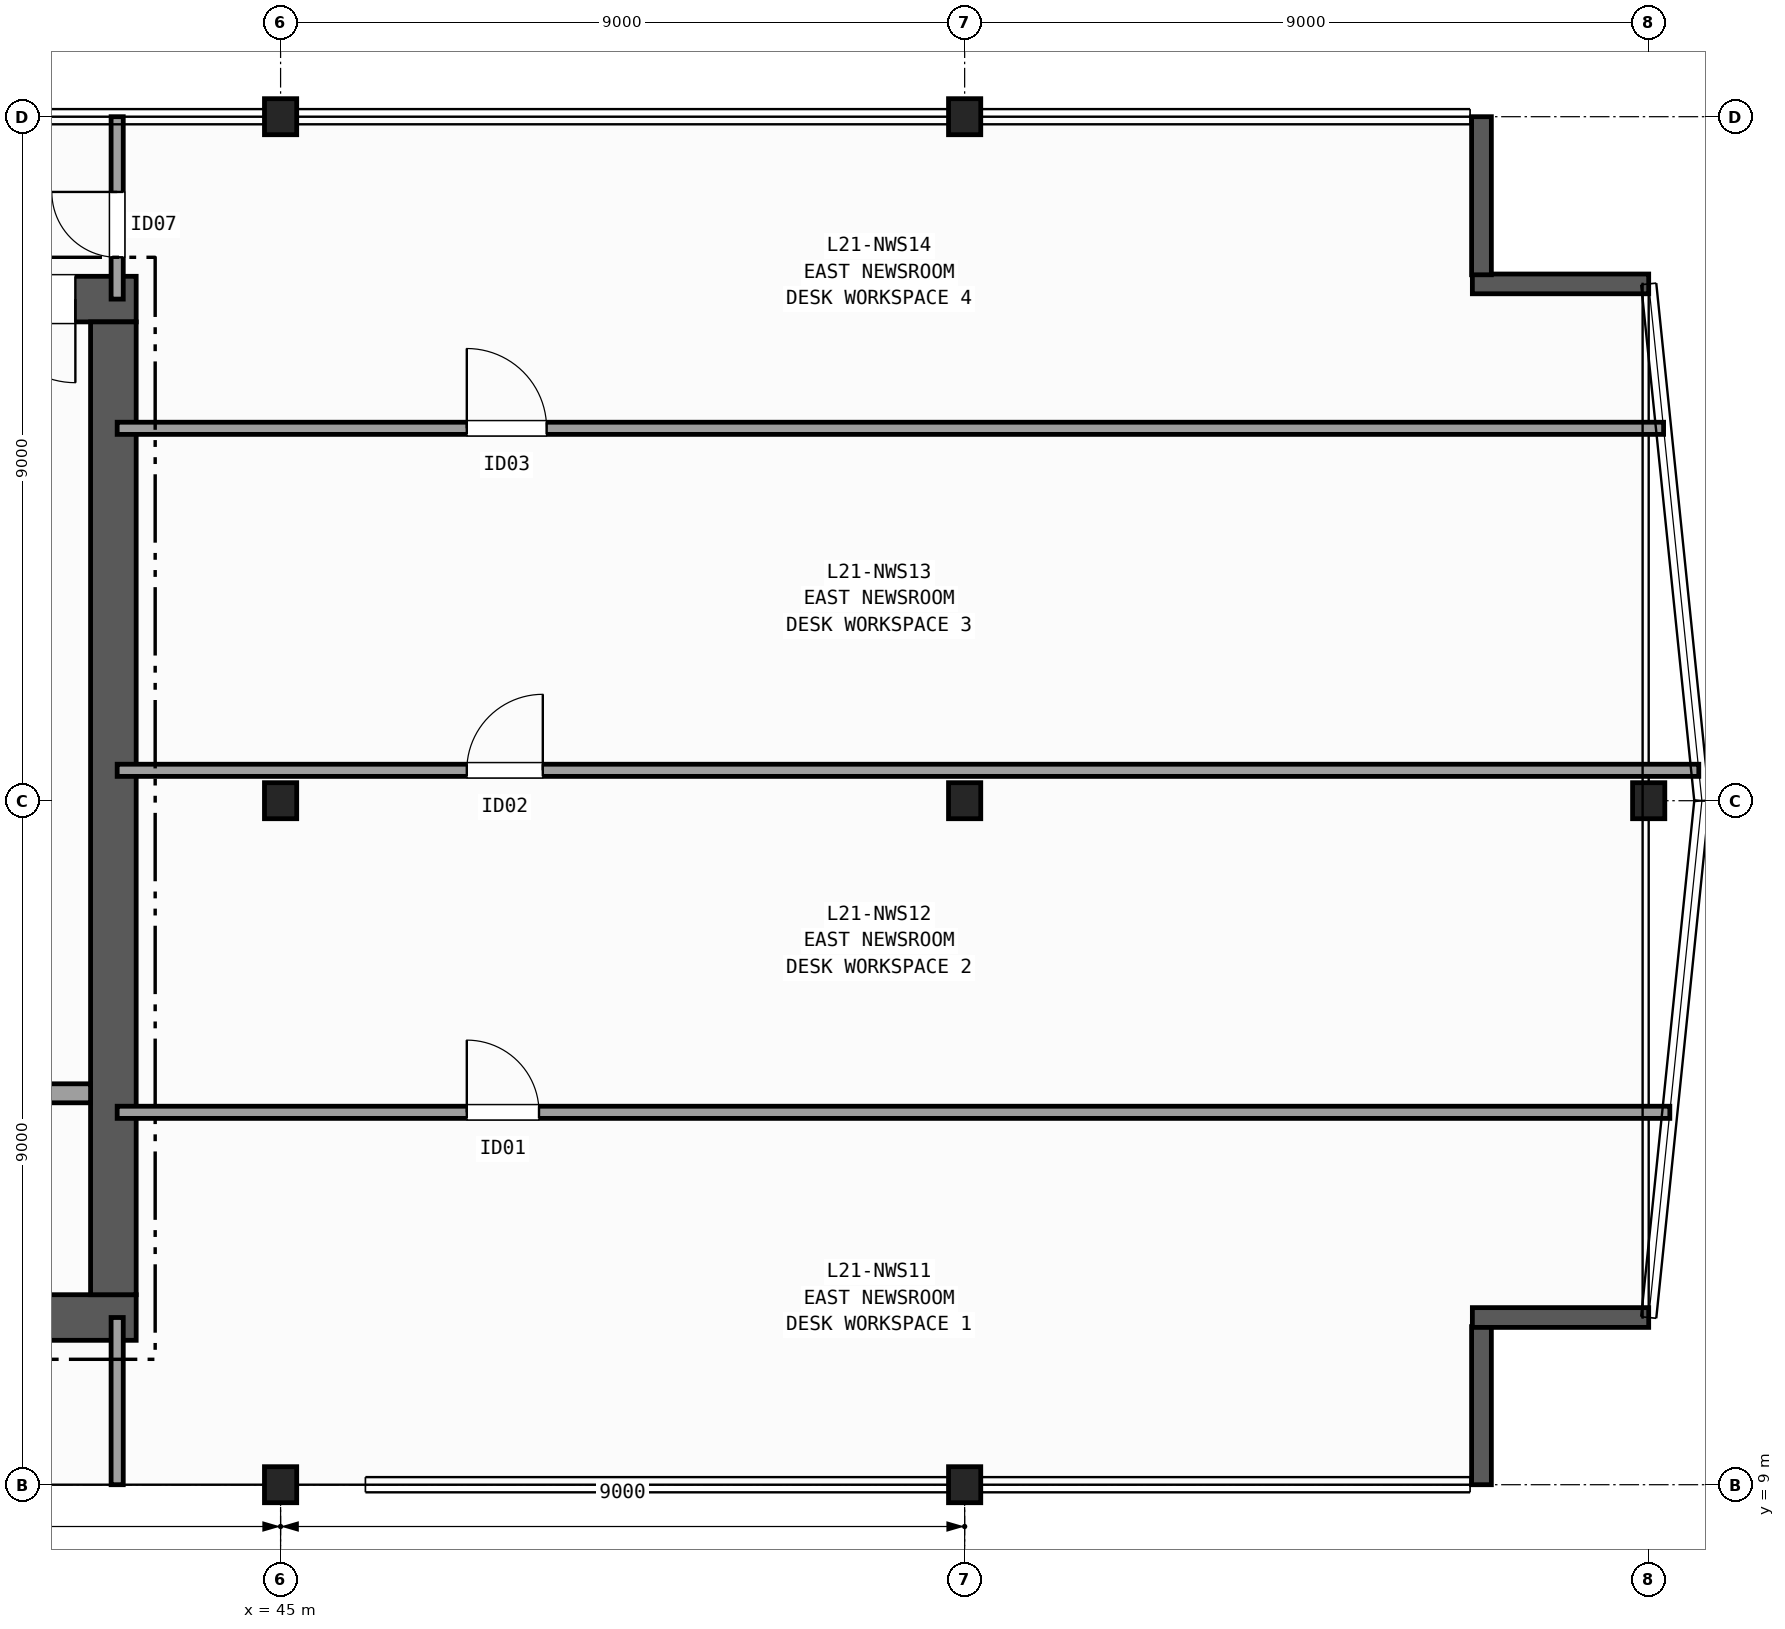
"""IFC4 building model, lengths in metres.
Left out: names, types, materials, properties, quantities, classifications, styles, units other than length and angle.
Written with IfcOpenShell. Run it as: python <this file> out.ifc"""

import sys

from ifc_helpers import new_model, si_unit, direction, frame, frame_2d, origin, origin_2d, place, context, subcontext, project, spatial, rectangle, i_section, extrude, element, fill, save


model = new_model("IFC4")
c1 = context("Model", 3, precision=1e-05, world=origin(), true_north=direction((0.0, 1.0)))
c2 = subcontext(c1, "Body", "Model", "MODEL_VIEW")
j1 = project(units=[si_unit("LENGTHUNIT", "METRE"), si_unit("PLANEANGLEUNIT", "RADIAN")], contexts=[c1])
p1 = place(None, origin())
s1 = spatial("IfcSite", under=j1, at=p1, CompositionType="ELEMENT")
p2 = place(p1, origin())
s2 = spatial("IfcBuilding", under=s1, at=p2, CompositionType="ELEMENT")
p3 = place(p2, frame((0.0, 0.0, 89.1)))
s3 = spatial("IfcBuildingStorey", under=s2, at=p3, CompositionType="ELEMENT", Elevation=89.1)
for number, where, z_axis, x_axis in (
    (1, (45.0, 9.0, 0.0), (0.0, 0.0, 1.0), (1.0, 0.0, 0.0)),
    (2, (45.0, 18.0, 0.0), (0.0, 0.0, 1.0), (1.0, 0.0, 0.0)),
    (3, (45.0, 27.0, 0.0), (0.0, 0.0, 1.0), (1.0, 0.0, 0.0)),
    (4, (54.0, 9.0, 0.0), (0.0, 0.0, 1.0), (1.0, 0.0, 0.0)),
    (5, (54.0, 18.0, 0.0), (0.0, 0.0, 1.0), (1.0, 0.0, 0.0)),
    (6, (54.0, 27.0, 0.0), (0.0, 0.0, 1.0), (1.0, 0.0, 0.0)),
    (7, (63.0, 18.0, 0.0), (0.0, 0.0, 1.0), (1.0, 0.0, 0.0)),
):
    element("IfcColumn", number, at=place(p3, frame(where, z_axis=z_axis, x_axis=x_axis)), inside=s3, PredefinedType="COLUMN", context=c2, shape_type="SweptSolid", body=[
        extrude(i_section(OverallWidth=0.424, OverallDepth=0.474, WebThickness=0.048, FlangeThickness=0.077, FilletRadius=0.015, at=origin_2d()), origin(), (0.0, 0.0, 1.0), 3.7),
    ])
p4 = place(p3, frame((60.8, 9.0, 0.0), z_axis=(0.0, 0.0, 1.0), x_axis=(0.0, 1.0, 0.0)))
e8 = element("IfcWall", 8, at=p4, inside=s3, PredefinedType="SOLIDWALL", context=c2, shape_type="SweptSolid", body=[
    extrude(rectangle(XDim=2.08, YDim=0.26, at=frame_2d((1.04, 0.0))), origin(), (0.0, 0.0, 1.0), 3.42),
])
for number, where, z_axis, x_axis in (
    (9, (60.68, 11.2, 0.0), (0.0, 0.0, 1.0), (1.0, 0.0, 0.0)),
    (10, (63.0, 24.8, 0.0), (0.0, 0.0, 1.0), (-1.0, 0.0, 0.0)),
):
    element("IfcWall", number, at=place(p3, frame(where, z_axis=z_axis, x_axis=x_axis)), inside=s3, PredefinedType="SOLIDWALL", context=c2, shape_type="SweptSolid", body=[
        extrude(rectangle(XDim=2.32, YDim=0.26, at=frame_2d((1.16, 0.0))), origin(), (0.0, 0.0, 1.0), 3.42),
    ])
p5 = place(p3, frame((60.8, 24.92, 0.0), z_axis=(0.0, 0.0, 1.0), x_axis=(0.0, 1.0, 0.0)))
e11 = element("IfcWall", 11, at=p5, inside=s3, PredefinedType="SOLIDWALL", context=c2, shape_type="SweptSolid", body=[
    extrude(rectangle(XDim=2.08, YDim=0.26, at=frame_2d((1.04, 0.0))), origin(), (0.0, 0.0, 1.0), 3.42),
])
p6 = place(p3, frame((29.1, 11.2, 0.0), z_axis=(0.0, 0.0, 1.0), x_axis=(1.0, 0.0, 0.0)))
e12 = element("IfcWall", 12, at=p6, inside=s3, PredefinedType="SHEAR", context=c2, shape_type="SweptSolid", body=[
    extrude(rectangle(XDim=14.0, YDim=0.6, at=frame_2d((7.0, 0.0))), origin(), (0.0, 0.0, 1.0), 3.42),
])
p7 = place(p3, frame((43.1, 24.6, 0.0), z_axis=(0.0, 0.0, 1.0), x_axis=(-1.0, 0.0, 0.0)))
e13 = element("IfcWall", 13, at=p7, inside=s3, PredefinedType="SHEAR", context=c2, shape_type="SweptSolid", body=[
    extrude(rectangle(XDim=14.0, YDim=0.6, at=frame_2d((7.0, 0.0))), origin(), (0.0, 0.0, 1.0), 3.42),
])
p8 = place(p7, frame((0.8, 0.0, 0.0)))
e14 = element("IfcOpeningElement", 14, at=p8, cuts=e13, PredefinedType="OPENING", context=c2, shape_type="SweptSolid", body=[
    extrude(rectangle(XDim=1.1, YDim=2.15, at=frame_2d((0.55, 1.075))), frame((0.0, 0.31, 0.0), z_axis=(0.0, -1.0, 0.0), x_axis=(1.0, 0.0, 0.0)), (0.0, 0.0, 1.0), 0.62),
])
p9 = place(p7, frame((2.3, 0.0, 0.0)))
e15 = element("IfcOpeningElement", 15, at=p9, cuts=e13, PredefinedType="OPENING", context=c2, shape_type="SweptSolid", body=[
    extrude(rectangle(XDim=0.9, YDim=2.1, at=frame_2d((0.45, 1.05))), frame((0.0, 0.31, 0.0), z_axis=(0.0, -1.0, 0.0), x_axis=(1.0, 0.0, 0.0)), (0.0, 0.0, 1.0), 0.62),
])
p10 = place(p7, frame((3.6, 0.0, 0.0)))
e16 = element("IfcOpeningElement", 16, at=p10, cuts=e13, PredefinedType="OPENING", context=c2, shape_type="SweptSolid", body=[
    extrude(rectangle(XDim=0.9, YDim=2.1, at=frame_2d((0.45, 1.05))), frame((0.0, 0.31, 0.0), z_axis=(0.0, -1.0, 0.0), x_axis=(1.0, 0.0, 0.0)), (0.0, 0.0, 1.0), 0.62),
])
p11 = place(p7, frame((4.95, 0.0, 0.0)))
e17 = element("IfcOpeningElement", 17, at=p11, cuts=e13, PredefinedType="OPENING", context=c2, shape_type="SweptSolid", body=[
    extrude(rectangle(XDim=0.9, YDim=2.1, at=frame_2d((0.45, 1.05))), frame((0.0, 0.31, 0.0), z_axis=(0.0, -1.0, 0.0), x_axis=(1.0, 0.0, 0.0)), (0.0, 0.0, 1.0), 0.62),
])
p12 = place(p3, frame((42.8, 11.5, 0.0), z_axis=(0.0, 0.0, 1.0), x_axis=(0.0, 1.0, 0.0)))
e18 = element("IfcWall", 18, at=p12, inside=s3, PredefinedType="SHEAR", context=c2, shape_type="SweptSolid", body=[
    extrude(rectangle(XDim=12.8, YDim=0.6, at=frame_2d((6.4, 0.0))), origin(), (0.0, 0.0, 1.0), 3.42),
])
p13 = place(p3, frame((33.07, 14.15, 0.0), z_axis=(0.0, 0.0, 1.0), x_axis=(1.0, 0.0, 0.0)))
e19 = element("IfcWall", 19, at=p13, inside=s3, PredefinedType="PARTITIONING", context=c2, shape_type="SweptSolid", body=[
    extrude(rectangle(XDim=9.43, YDim=0.25, at=frame_2d((4.715, 0.0))), origin(), (0.0, 0.0, 1.0), 3.42),
])
p14 = place(p13, frame((0.755, 0.0, 0.0)))
e20 = element("IfcOpeningElement", 20, at=p14, cuts=e19, PredefinedType="OPENING", context=c2, shape_type="SweptSolid", body=[
    extrude(rectangle(XDim=1.15, YDim=2.15, at=frame_2d((0.575, 1.075))), frame((0.0, 0.135, 0.0), z_axis=(0.0, -1.0, 0.0), x_axis=(1.0, 0.0, 0.0)), (0.0, 0.0, 1.0), 0.27),
])
p15 = place(p13, frame((3.355, 0.0, 0.0)))
e21 = element("IfcOpeningElement", 21, at=p15, cuts=e19, PredefinedType="OPENING", context=c2, shape_type="SweptSolid", body=[
    extrude(rectangle(XDim=1.15, YDim=2.15, at=frame_2d((0.575, 1.075))), frame((0.0, 0.135, 0.0), z_axis=(0.0, -1.0, 0.0), x_axis=(1.0, 0.0, 0.0)), (0.0, 0.0, 1.0), 0.27),
])
p16 = place(p3, frame((42.85, 9.0, 0.0), z_axis=(0.0, 0.0, 1.0), x_axis=(0.0, 1.0, 0.0)))
e22 = element("IfcWall", 22, at=p16, inside=s3, PredefinedType="PARTITIONING", context=c2, shape_type="SweptSolid", body=[
    extrude(rectangle(XDim=2.2, YDim=0.16, at=frame_2d((1.1, 0.0))), origin(), (0.0, 0.0, 1.0), 2.627),
])
p17 = place(p3, frame((42.85, 24.6, 0.0), z_axis=(0.0, 0.0, 1.0), x_axis=(0.0, 1.0, 0.0)))
e23 = element("IfcWall", 23, at=p17, inside=s3, PredefinedType="PARTITIONING", context=c2, shape_type="SweptSolid", body=[
    extrude(rectangle(XDim=2.4, YDim=0.16, at=frame_2d((1.2, 0.0))), origin(), (0.0, 0.0, 1.0), 2.627),
])
p18 = place(p17, frame((0.55, 0.0, 0.0)))
e24 = element("IfcOpeningElement", 24, at=p18, cuts=e23, PredefinedType="OPENING", context=c2, shape_type="SweptSolid", body=[
    extrude(rectangle(XDim=0.86, YDim=2.05, at=frame_2d((0.43, 1.025))), frame((0.0, 0.09, 0.0), z_axis=(0.0, -1.0, 0.0), x_axis=(1.0, 0.0, 0.0)), (0.0, 0.0, 1.0), 0.18),
])
p19 = place(p3, frame((42.85, 13.9, 0.0), z_axis=(0.0, 0.0, 1.0), x_axis=(1.0, 0.0, 0.0)))
e25 = element("IfcWall", 25, at=p19, inside=s3, PredefinedType="PARTITIONING", context=c2, shape_type="SweptSolid", body=[
    extrude(rectangle(XDim=20.428, YDim=0.16, at=frame_2d((10.214, 0.0))), origin(), (0.0, 0.0, 1.0), 3.42),
])
p20 = place(p19, frame((4.6, 0.0, 0.0)))
e26 = element("IfcOpeningElement", 26, at=p20, cuts=e25, PredefinedType="OPENING", context=c2, shape_type="SweptSolid", body=[
    extrude(rectangle(XDim=0.95, YDim=2.1, at=frame_2d((0.475, 1.05))), frame((0.0, 0.09, 0.0), z_axis=(0.0, -1.0, 0.0), x_axis=(1.0, 0.0, 0.0)), (0.0, 0.0, 1.0), 0.18),
])
p21 = place(p3, frame((42.85, 18.4, 0.0), z_axis=(0.0, 0.0, 1.0), x_axis=(1.0, 0.0, 0.0)))
e27 = element("IfcWall", 27, at=p21, inside=s3, PredefinedType="PARTITIONING", context=c2, shape_type="SweptSolid", body=[
    extrude(rectangle(XDim=20.809, YDim=0.16, at=frame_2d((10.404, 0.0))), origin(), (0.0, 0.0, 1.0), 3.42),
])
p22 = place(p21, frame((4.6, 0.0, 0.0)))
e28 = element("IfcOpeningElement", 28, at=p22, cuts=e27, PredefinedType="OPENING", context=c2, shape_type="SweptSolid", body=[
    extrude(rectangle(XDim=1.0, YDim=2.1, at=frame_2d((0.5, 1.05))), frame((0.0, 0.09, 0.0), z_axis=(0.0, -1.0, 0.0), x_axis=(1.0, 0.0, 0.0)), (0.0, 0.0, 1.0), 0.18),
])
p23 = place(p3, frame((42.85, 22.9, 0.0), z_axis=(0.0, 0.0, 1.0), x_axis=(1.0, 0.0, 0.0)))
e29 = element("IfcWall", 29, at=p23, inside=s3, PredefinedType="PARTITIONING", context=c2, shape_type="SweptSolid", body=[
    extrude(rectangle(XDim=20.346, YDim=0.16, at=frame_2d((10.173, 0.0))), origin(), (0.0, 0.0, 1.0), 3.42),
])
p24 = place(p23, frame((4.6, 0.0, 0.0)))
e30 = element("IfcOpeningElement", 30, at=p24, cuts=e29, PredefinedType="OPENING", context=c2, shape_type="SweptSolid", body=[
    extrude(rectangle(XDim=1.05, YDim=2.15, at=frame_2d((0.525, 1.075))), frame((0.0, 0.09, 0.0), z_axis=(0.0, -1.0, 0.0), x_axis=(1.0, 0.0, 0.0)), (0.0, 0.0, 1.0), 0.18),
])
p25 = place(p8, origin())
e31 = element("IfcDoor", 31, at=p25, inside=s3, OperationType="SINGLE_SWING_LEFT", PredefinedType="DOOR", context=c2, shape_type="SweptSolid", body=[
    extrude(rectangle(XDim=1.1, YDim=2.15, at=frame_2d((0.55, 1.075))), frame((0.0, 0.025, 0.0), z_axis=(0.0, -1.0, 0.0), x_axis=(1.0, 0.0, 0.0)), (0.0, 0.0, 1.0), 0.05),
])
fill(e14, e31)
p26 = place(p18, origin())
e32 = element("IfcDoor", 32, at=p26, inside=s3, OperationType="SINGLE_SWING_RIGHT", PredefinedType="DOOR", context=c2, shape_type="SweptSolid", body=[
    extrude(rectangle(XDim=0.86, YDim=2.05, at=frame_2d((0.43, 1.025))), frame((0.0, 0.025, 0.0), z_axis=(0.0, -1.0, 0.0), x_axis=(1.0, 0.0, 0.0)), (0.0, 0.0, 1.0), 0.05),
])
fill(e24, e32)
p27 = place(p20, origin())
e33 = element("IfcDoor", 33, at=p27, inside=s3, OperationType="SINGLE_SWING_LEFT", PredefinedType="DOOR", context=c2, shape_type="SweptSolid", body=[
    extrude(rectangle(XDim=0.95, YDim=2.1, at=frame_2d((0.475, 1.05))), frame((0.0, 0.025, 0.0), z_axis=(0.0, -1.0, 0.0), x_axis=(1.0, 0.0, 0.0)), (0.0, 0.0, 1.0), 0.05),
])
fill(e26, e33)
p28 = place(p22, origin())
e34 = element("IfcDoor", 34, at=p28, inside=s3, OperationType="SINGLE_SWING_RIGHT", PredefinedType="DOOR", context=c2, shape_type="SweptSolid", body=[
    extrude(rectangle(XDim=1.0, YDim=2.1, at=frame_2d((0.5, 1.05))), frame((0.0, 0.025, 0.0), z_axis=(0.0, -1.0, 0.0), x_axis=(1.0, 0.0, 0.0)), (0.0, 0.0, 1.0), 0.05),
])
fill(e28, e34)
p29 = place(p24, origin())
e35 = element("IfcDoor", 35, at=p29, inside=s3, OperationType="SINGLE_SWING_LEFT", PredefinedType="DOOR", context=c2, shape_type="SweptSolid", body=[
    extrude(rectangle(XDim=1.05, YDim=2.15, at=frame_2d((0.525, 1.075))), frame((0.0, 0.025, 0.0), z_axis=(0.0, -1.0, 0.0), x_axis=(1.0, 0.0, 0.0)), (0.0, 0.0, 1.0), 0.05),
])
fill(e30, e35)
save(model, sys.argv[1])
